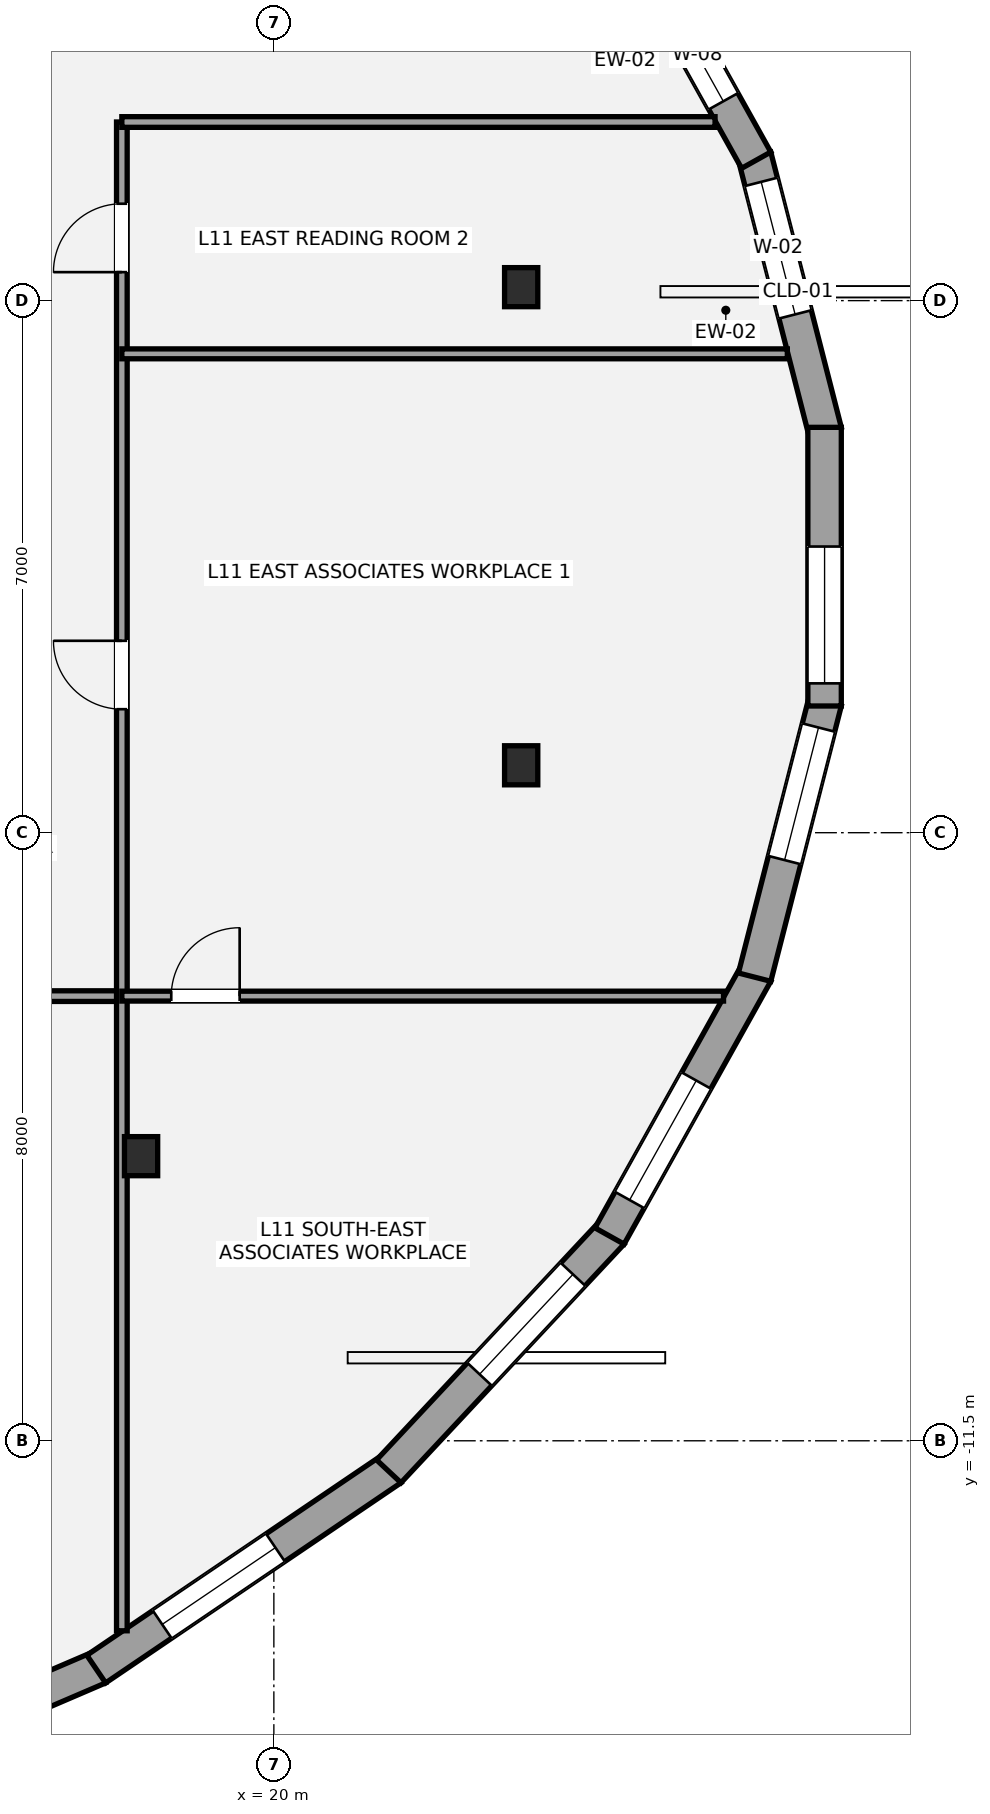
"""IFC4 building model, lengths in metres.
Left out: names, types, materials, properties, quantities, classifications, styles, units other than length and angle.
Written with IfcOpenShell. Run it as: python <this file> out.ifc"""

import sys

from ifc_helpers import new_model, si_unit, direction, frame, frame_2d, origin, origin_2d, place, context, subcontext, project, spatial, rectangle, i_section, extrude, element, fill, save


model = new_model("IFC4")
c1 = context("Model", 3, precision=1e-05, world=origin(), true_north=direction((0.0, 1.0)))
c2 = subcontext(c1, "Body", "Model", "MODEL_VIEW")
j1 = project(units=[si_unit("LENGTHUNIT", "METRE"), si_unit("PLANEANGLEUNIT", "RADIAN")], contexts=[c1])
p1 = place(None, origin())
s1 = spatial("IfcSite", under=j1, at=p1, CompositionType="ELEMENT")
p2 = place(p1, origin())
s2 = spatial("IfcBuilding", under=s1, at=p2, CompositionType="ELEMENT")
p3 = place(p2, frame((0.0, 0.0, 45.0)))
s3 = spatial("IfcBuildingStorey", under=s2, at=p3, CompositionType="ELEMENT", Elevation=45.0)
for number, where, z_axis, x_axis in (
    (1, (23.254, 3.677, 0.0), (0.0, 0.0, 1.0), (1.0, 0.0, 0.0)),
    (2, (18.253, -7.756, 0.0), (0.0, 0.0, 1.0), (1.0, 0.0, 0.0)),
    (3, (23.254, -2.613, 0.0), (0.0, 0.0, 1.0), (1.0, 0.0, 0.0)),
):
    element("IfcColumn", number, at=place(p3, frame(where, z_axis=z_axis, x_axis=x_axis)), inside=s3, PredefinedType="COLUMN", context=c2, shape_type="SweptSolid", body=[
        extrude(i_section(OverallWidth=0.437, OverallDepth=0.514, WebThickness=0.061, FlangeThickness=0.097, at=origin_2d()), origin(), (0.0, 0.0, 1.0), 3.6),
    ])
p4 = place(p3, frame((26.325, 5.4, 0.0), z_axis=(0.0, 0.0, 1.0), x_axis=(0.248062710061, -0.968743976434, 0.0)))
e4 = element("IfcWall", 4, at=p4, inside=s3, PredefinedType="STANDARD", context=c2, shape_type="SweptSolid", body=[
    extrude(rectangle(XDim=3.739, YDim=0.44, at=frame_2d((1.87, 0.0))), origin(), (0.0, 0.0, 1.0), 2.529),
])
p5 = place(p4, frame((0.349, 0.0, 0.65)))
e5 = element("IfcOpeningElement", 5, at=p5, cuts=e4, PredefinedType="OPENING", context=c2, shape_type="SweptSolid", body=[
    extrude(rectangle(XDim=1.8, YDim=1.7, at=frame_2d((0.9, 0.85))), frame((0.0, 0.23, 0.0), z_axis=(0.0, -1.0, 0.0), x_axis=(1.0, 0.0, 0.0)), (0.0, 0.0, 1.0), 0.46),
])
p6 = place(p3, frame((24.416, 8.806, 0.0), z_axis=(0.0, 0.0, 1.0), x_axis=(0.487369438963, -0.873195871477, 0.0)))
e6 = element("IfcWall", 6, at=p6, inside=s3, PredefinedType="STANDARD", context=c2, shape_type="SweptSolid", body=[
    extrude(rectangle(XDim=3.96, YDim=0.44, at=frame_2d((1.98, 0.0))), origin(), (0.0, 0.0, 1.0), 2.529),
])
p7 = place(p6, frame((1.673, 0.0, 0.58)))
e7 = element("IfcOpeningElement", 7, at=p7, cuts=e6, PredefinedType="OPENING", context=c2, shape_type="SweptSolid", body=[
    extrude(rectangle(XDim=1.4, YDim=1.55, at=frame_2d((0.7, 0.775))), frame((0.0, 0.23, 0.0), z_axis=(0.0, -1.0, 0.0), x_axis=(1.0, 0.0, 0.0)), (0.0, 0.0, 1.0), 0.46),
])
p8 = place(p3, frame((17.7, -14.483, 0.0), z_axis=(0.0, 0.0, 1.0), x_axis=(-0.918881850071, -0.394532819433, 0.0)))
e8 = element("IfcWall", 8, at=p8, inside=s3, PredefinedType="STANDARD", context=c2, shape_type="SweptSolid", body=[
    extrude(rectangle(XDim=5.042, YDim=0.44, at=frame_2d((2.521, 0.0))), origin(), (0.0, 0.0, 1.0), 2.529),
])
p9 = place(p8, frame((1.297, 0.0, 0.65)))
e9 = element("IfcOpeningElement", 9, at=p9, cuts=e8, PredefinedType="OPENING", context=c2, shape_type="SweptSolid", body=[
    extrude(rectangle(XDim=1.8, YDim=1.7, at=frame_2d((0.9, 0.85))), frame((0.0, 0.23, 0.0), z_axis=(0.0, -1.0, 0.0), x_axis=(1.0, 0.0, 0.0)), (0.0, 0.0, 1.0), 0.46),
])
p10 = place(p3, frame((21.549, -11.87, 0.0), z_axis=(0.0, 0.0, 1.0), x_axis=(-0.827825981515, -0.560984976919, 0.0)))
e10 = element("IfcWall", 10, at=p10, inside=s3, PredefinedType="STANDARD", context=c2, shape_type="SweptSolid", body=[
    extrude(rectangle(XDim=4.695, YDim=0.44, at=frame_2d((2.347, 0.0))), origin(), (0.0, 0.0, 1.0), 2.529),
])
p11 = place(p10, frame((1.846, 0.0, 0.65)))
e11 = element("IfcOpeningElement", 11, at=p11, cuts=e10, PredefinedType="OPENING", context=c2, shape_type="SweptSolid", body=[
    extrude(rectangle(XDim=1.8, YDim=1.7, at=frame_2d((0.9, 0.85))), frame((0.0, 0.23, 0.0), z_axis=(0.0, -1.0, 0.0), x_axis=(1.0, 0.0, 0.0)), (0.0, 0.0, 1.0), 0.46),
])
p12 = place(p3, frame((24.448, -8.763, 0.0), z_axis=(0.0, 0.0, 1.0), x_axis=(-0.68299392258, -0.730424056093, 0.0)))
e12 = element("IfcWall", 12, at=p12, inside=s3, PredefinedType="STANDARD", context=c2, shape_type="SweptSolid", body=[
    extrude(rectangle(XDim=4.298, YDim=0.44, at=frame_2d((2.149, 0.0))), origin(), (0.0, 0.0, 1.0), 2.529),
])
p13 = place(p12, frame((0.75, 0.0, 0.65)))
e13 = element("IfcOpeningElement", 13, at=p13, cuts=e12, PredefinedType="OPENING", context=c2, shape_type="SweptSolid", body=[
    extrude(rectangle(XDim=1.8, YDim=1.7, at=frame_2d((0.9, 0.85))), frame((0.0, 0.23, 0.0), z_axis=(0.0, -1.0, 0.0), x_axis=(1.0, 0.0, 0.0)), (0.0, 0.0, 1.0), 0.46),
])
p14 = place(p3, frame((26.346, -5.348, 0.0), z_axis=(0.0, 0.0, 1.0), x_axis=(-0.487369438963, -0.873195871477, 0.0)))
e14 = element("IfcWall", 14, at=p14, inside=s3, PredefinedType="STANDARD", context=c2, shape_type="SweptSolid", body=[
    extrude(rectangle(XDim=3.96, YDim=0.44, at=frame_2d((1.98, 0.0))), origin(), (0.0, 0.0, 1.0), 2.529),
])
p15 = place(p14, frame((1.618, 0.0, 0.65)))
e15 = element("IfcOpeningElement", 15, at=p15, cuts=e14, PredefinedType="OPENING", context=c2, shape_type="SweptSolid", body=[
    extrude(rectangle(XDim=1.8, YDim=1.7, at=frame_2d((0.9, 0.85))), frame((0.0, 0.23, 0.0), z_axis=(0.0, -1.0, 0.0), x_axis=(1.0, 0.0, 0.0)), (0.0, 0.0, 1.0), 0.46),
])
p16 = place(p3, frame((27.253, -1.778, 0.0), z_axis=(0.0, 0.0, 1.0), x_axis=(-0.248062710061, -0.968743976434, 0.0)))
e16 = element("IfcWall", 16, at=p16, inside=s3, PredefinedType="STANDARD", context=c2, shape_type="SweptSolid", body=[
    extrude(rectangle(XDim=3.739, YDim=0.44, at=frame_2d((1.87, 0.0))), origin(), (0.0, 0.0, 1.0), 2.529),
])
p17 = place(p16, frame((0.349, 0.0, 0.65)))
e17 = element("IfcOpeningElement", 17, at=p17, cuts=e16, PredefinedType="OPENING", context=c2, shape_type="SweptSolid", body=[
    extrude(rectangle(XDim=1.8, YDim=1.7, at=frame_2d((0.9, 0.85))), frame((0.0, 0.23, 0.0), z_axis=(0.0, -1.0, 0.0), x_axis=(1.0, 0.0, 0.0)), (0.0, 0.0, 1.0), 0.46),
])
p18 = place(p3, frame((27.246, 1.833, 0.0), z_axis=(0.0, 0.0, 1.0), x_axis=(0.0, -1.0, 0.0)))
e18 = element("IfcWall", 18, at=p18, inside=s3, PredefinedType="STANDARD", context=c2, shape_type="SweptSolid", body=[
    extrude(rectangle(XDim=3.666, YDim=0.44, at=frame_2d((1.833, 0.0))), origin(), (0.0, 0.0, 1.0), 2.529),
])
p19 = place(p18, frame((1.568, 0.0, 0.65)))
e19 = element("IfcOpeningElement", 19, at=p19, cuts=e18, PredefinedType="OPENING", context=c2, shape_type="SweptSolid", body=[
    extrude(rectangle(XDim=1.8, YDim=1.7, at=frame_2d((0.9, 0.85))), frame((0.0, 0.23, 0.0), z_axis=(0.0, -1.0, 0.0), x_axis=(1.0, 0.0, 0.0)), (0.0, 0.0, 1.0), 0.46),
])
p20 = place(p3, frame((-16.1, -5.65, 0.0), z_axis=(0.0, 0.0, 1.0), x_axis=(1.0, 0.0, 0.0)))
e20 = element("IfcWall", 20, at=p20, inside=s3, PredefinedType="PARTITIONING", context=c2, shape_type="SweptSolid", body=[
    extrude(rectangle(XDim=34.1, YDim=0.14, at=frame_2d((17.05, 0.0))), origin(), (0.0, 0.0, 1.0), 2.853),
])
p21 = place(p20, frame((5.35, 0.0, 0.0)))
e21 = element("IfcOpeningElement", 21, at=p21, cuts=e20, PredefinedType="OPENING", context=c2, shape_type="SweptSolid", body=[
    extrude(rectangle(XDim=0.9, YDim=2.1, at=frame_2d((0.45, 1.05))), frame((0.0, 0.08, 0.0), z_axis=(0.0, -1.0, 0.0), x_axis=(1.0, 0.0, 0.0)), (0.0, 0.0, 1.0), 0.16),
])
p22 = place(p20, frame((15.85, 0.0, 0.0)))
e22 = element("IfcOpeningElement", 22, at=p22, cuts=e20, PredefinedType="OPENING", context=c2, shape_type="SweptSolid", body=[
    extrude(rectangle(XDim=1.5, YDim=2.15, at=frame_2d((0.75, 1.075))), frame((0.0, 0.08, 0.0), z_axis=(0.0, -1.0, 0.0), x_axis=(1.0, 0.0, 0.0)), (0.0, 0.0, 1.0), 0.16),
])
p23 = place(p20, frame((27.4, 0.0, 0.0)))
e23 = element("IfcOpeningElement", 23, at=p23, cuts=e20, PredefinedType="OPENING", context=c2, shape_type="SweptSolid", body=[
    extrude(rectangle(XDim=0.9, YDim=2.1, at=frame_2d((0.45, 1.05))), frame((0.0, 0.08, 0.0), z_axis=(0.0, -1.0, 0.0), x_axis=(1.0, 0.0, 0.0)), (0.0, 0.0, 1.0), 0.16),
])
p24 = place(p3, frame((18.0, -14.0, 0.0), z_axis=(0.0, 0.0, 1.0), x_axis=(0.0, 1.0, 0.0)))
e24 = element("IfcWall", 24, at=p24, inside=s3, PredefinedType="PARTITIONING", context=c2, shape_type="SweptSolid", body=[
    extrude(rectangle(XDim=19.85, YDim=0.14, at=frame_2d((9.925, 0.0))), origin(), (0.0, 0.0, 1.0), 2.841),
])
p25 = place(p24, frame((12.125, 0.0, 0.0)))
e25 = element("IfcOpeningElement", 25, at=p25, cuts=e24, PredefinedType="OPENING", context=c2, shape_type="SweptSolid", body=[
    extrude(rectangle(XDim=0.9, YDim=2.1, at=frame_2d((0.45, 1.05))), frame((0.0, 0.08, 0.0), z_axis=(0.0, -1.0, 0.0), x_axis=(1.0, 0.0, 0.0)), (0.0, 0.0, 1.0), 0.16),
])
p26 = place(p24, frame((17.875, 0.0, 0.0)))
e26 = element("IfcOpeningElement", 26, at=p26, cuts=e24, PredefinedType="OPENING", context=c2, shape_type="SweptSolid", body=[
    extrude(rectangle(XDim=0.9, YDim=2.1, at=frame_2d((0.45, 1.05))), frame((0.0, 0.08, 0.0), z_axis=(0.0, -1.0, 0.0), x_axis=(1.0, 0.0, 0.0)), (0.0, 0.0, 1.0), 0.16),
])
p27 = place(p3, frame((18.0, 5.85, 0.0), z_axis=(0.0, 0.0, 1.0), x_axis=(1.0, 0.0, 0.0)))
e27 = element("IfcWall", 27, at=p27, inside=s3, PredefinedType="PARTITIONING", context=c2, shape_type="SweptSolid", body=[
    extrude(rectangle(XDim=7.805, YDim=0.14, at=frame_2d((3.902, 0.0))), origin(), (0.0, 0.0, 1.0), 3.4),
])
p28 = place(p3, frame((18.0, -5.65, 0.0), z_axis=(0.0, 0.0, 1.0), x_axis=(1.0, 0.0, 0.0)))
e28 = element("IfcWall", 28, at=p28, inside=s3, PredefinedType="PARTITIONING", context=c2, shape_type="SweptSolid", body=[
    extrude(rectangle(XDim=7.917, YDim=0.13, at=frame_2d((3.958, 0.0))), origin(), (0.0, 0.0, 1.0), 2.779),
])
p29 = place(p28, frame((0.65, 0.0, 0.0)))
e29 = element("IfcOpeningElement", 29, at=p29, cuts=e28, PredefinedType="OPENING", context=c2, shape_type="SweptSolid", body=[
    extrude(rectangle(XDim=0.9, YDim=2.1, at=frame_2d((0.45, 1.05))), frame((0.0, 0.075, 0.0), z_axis=(0.0, -1.0, 0.0), x_axis=(1.0, 0.0, 0.0)), (0.0, 0.0, 1.0), 0.15),
])
p30 = place(p3, frame((18.0, 2.8, 0.0), z_axis=(0.0, 0.0, 1.0), x_axis=(1.0, 0.0, 0.0)))
e30 = element("IfcWall", 30, at=p30, inside=s3, PredefinedType="PARTITIONING", context=c2, shape_type="SweptSolid", body=[
    extrude(rectangle(XDim=8.756, YDim=0.13, at=frame_2d((4.378, 0.0))), origin(), (0.0, 0.0, 1.0), 2.841),
])
p31 = place(p5, origin())
e31 = element("IfcWindow", 31, at=p31, inside=s3, PartitioningType="SINGLE_PANEL", PredefinedType="WINDOW", context=c2, shape_type="SweptSolid", body=[
    extrude(rectangle(XDim=1.8, YDim=1.7, at=frame_2d((0.9, 0.85))), frame((0.0, -0.01, 0.0), z_axis=(0.0, -1.0, 0.0), x_axis=(1.0, 0.0, 0.0)), (0.0, 0.0, 1.0), 0.06),
])
fill(e5, e31)
p32 = place(p7, origin())
e32 = element("IfcWindow", 32, at=p32, inside=s3, PartitioningType="SINGLE_PANEL", PredefinedType="WINDOW", context=c2, shape_type="SweptSolid", body=[
    extrude(rectangle(XDim=1.4, YDim=1.55, at=frame_2d((0.7, 0.775))), frame((0.0, -0.01, 0.0), z_axis=(0.0, -1.0, 0.0), x_axis=(1.0, 0.0, 0.0)), (0.0, 0.0, 1.0), 0.06),
])
fill(e7, e32)
p33 = place(p11, origin())
e33 = element("IfcWindow", 33, at=p33, inside=s3, PartitioningType="SINGLE_PANEL", PredefinedType="WINDOW", context=c2, shape_type="SweptSolid", body=[
    extrude(rectangle(XDim=1.8, YDim=1.7, at=frame_2d((0.9, 0.85))), frame((0.0, -0.01, 0.0), z_axis=(0.0, -1.0, 0.0), x_axis=(1.0, 0.0, 0.0)), (0.0, 0.0, 1.0), 0.06),
])
fill(e11, e33)
p34 = place(p13, origin())
e34 = element("IfcWindow", 34, at=p34, inside=s3, PartitioningType="SINGLE_PANEL", PredefinedType="WINDOW", context=c2, shape_type="SweptSolid", body=[
    extrude(rectangle(XDim=1.8, YDim=1.7, at=frame_2d((0.9, 0.85))), frame((0.0, -0.01, 0.0), z_axis=(0.0, -1.0, 0.0), x_axis=(1.0, 0.0, 0.0)), (0.0, 0.0, 1.0), 0.06),
])
fill(e13, e34)
p35 = place(p15, origin())
e35 = element("IfcWindow", 35, at=p35, inside=s3, PartitioningType="SINGLE_PANEL", PredefinedType="WINDOW", context=c2, shape_type="SweptSolid", body=[
    extrude(rectangle(XDim=1.8, YDim=1.7, at=frame_2d((0.9, 0.85))), frame((0.0, -0.01, 0.0), z_axis=(0.0, -1.0, 0.0), x_axis=(1.0, 0.0, 0.0)), (0.0, 0.0, 1.0), 0.06),
])
fill(e15, e35)
p36 = place(p17, origin())
e36 = element("IfcWindow", 36, at=p36, inside=s3, PartitioningType="SINGLE_PANEL", PredefinedType="WINDOW", context=c2, shape_type="SweptSolid", body=[
    extrude(rectangle(XDim=1.8, YDim=1.7, at=frame_2d((0.9, 0.85))), frame((0.0, -0.01, 0.0), z_axis=(0.0, -1.0, 0.0), x_axis=(1.0, 0.0, 0.0)), (0.0, 0.0, 1.0), 0.06),
])
fill(e17, e36)
p37 = place(p19, origin())
e37 = element("IfcWindow", 37, at=p37, inside=s3, PartitioningType="SINGLE_PANEL", PredefinedType="WINDOW", context=c2, shape_type="SweptSolid", body=[
    extrude(rectangle(XDim=1.8, YDim=1.7, at=frame_2d((0.9, 0.85))), frame((0.0, -0.01, 0.0), z_axis=(0.0, -1.0, 0.0), x_axis=(1.0, 0.0, 0.0)), (0.0, 0.0, 1.0), 0.06),
])
fill(e19, e37)
p38 = place(p29, origin())
e38 = element("IfcDoor", 38, at=p38, inside=s3, OperationType="SINGLE_SWING_RIGHT", PredefinedType="DOOR", context=c2, shape_type="SweptSolid", body=[
    extrude(rectangle(XDim=0.9, YDim=2.1, at=frame_2d((0.45, 1.05))), frame((0.0, 0.025, 0.0), z_axis=(0.0, -1.0, 0.0), x_axis=(1.0, 0.0, 0.0)), (0.0, 0.0, 1.0), 0.05),
])
fill(e29, e38)
p39 = place(p25, origin())
e39 = element("IfcDoor", 39, at=p39, inside=s3, OperationType="SINGLE_SWING_RIGHT", PredefinedType="DOOR", context=c2, shape_type="SweptSolid", body=[
    extrude(rectangle(XDim=0.9, YDim=2.1, at=frame_2d((0.45, 1.05))), frame((0.0, 0.025, 0.0), z_axis=(0.0, -1.0, 0.0), x_axis=(1.0, 0.0, 0.0)), (0.0, 0.0, 1.0), 0.05),
])
fill(e25, e39)
p40 = place(p26, origin())
e40 = element("IfcDoor", 40, at=p40, inside=s3, OperationType="SINGLE_SWING_LEFT", PredefinedType="DOOR", context=c2, shape_type="SweptSolid", body=[
    extrude(rectangle(XDim=0.9, YDim=2.1, at=frame_2d((0.45, 1.05))), frame((0.0, 0.025, 0.0), z_axis=(0.0, -1.0, 0.0), x_axis=(1.0, 0.0, 0.0)), (0.0, 0.0, 1.0), 0.05),
])
fill(e26, e40)
save(model, sys.argv[1])
